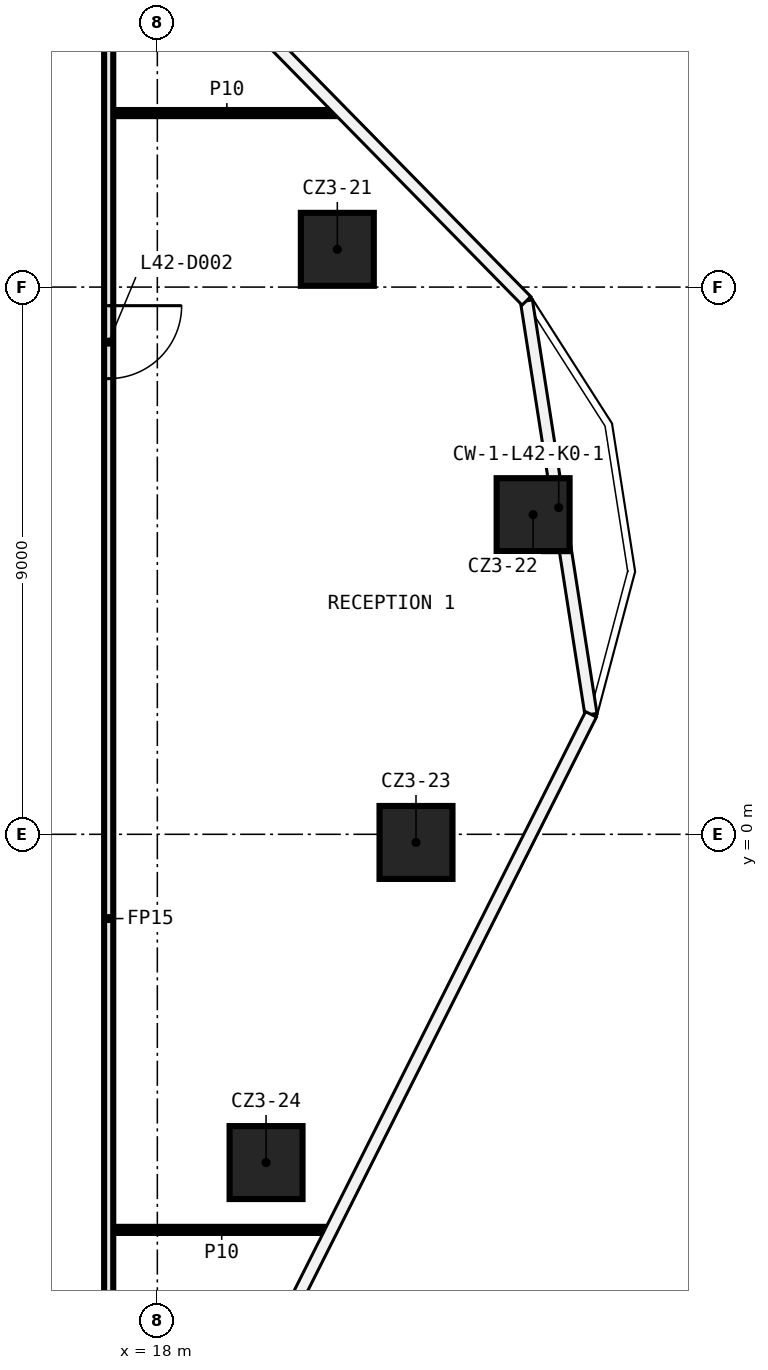
"""IFC4 building model, lengths in metres.
Left out: names, types, materials, properties, quantities, classifications, styles, units other than length and angle.
Written with IfcOpenShell. Run it as: python <this file> out.ifc"""

import sys

from ifc_helpers import new_model, si_unit, direction, frame, frame_2d, origin, origin_2d, place, context, subcontext, project, spatial, rectangle, extrude, element, fill, save


model = new_model("IFC4")
c1 = context("Model", 3, precision=1e-05, world=origin(), true_north=direction((0.0, 1.0)))
c2 = subcontext(c1, "Body", "Model", "MODEL_VIEW")
j1 = project(units=[si_unit("LENGTHUNIT", "METRE"), si_unit("PLANEANGLEUNIT", "RADIAN")], contexts=[c1])
p1 = place(None, origin())
s1 = spatial("IfcSite", under=j1, at=p1, CompositionType="ELEMENT")
p2 = place(p1, origin())
s2 = spatial("IfcBuilding", under=s1, at=p2, CompositionType="ELEMENT")
p3 = place(p2, frame((0.0, 0.0, 203.0)))
s3 = spatial("IfcBuildingStorey", under=s2, at=p3, CompositionType="ELEMENT", Elevation=203.0)
for number, where, z_axis, x_axis in (
    (1, (20.96, 9.621, 0.0), (0.0, 0.0, 1.0), (1.0, 0.0, 0.0)),
    (2, (24.18, 5.257, 0.0), (0.0, 0.0, 1.0), (1.0, 0.0, 0.0)),
    (3, (22.254, -0.134, 0.0), (0.0, 0.0, 1.0), (1.0, 0.0, 0.0)),
    (4, (19.788, -5.399, 0.0), (0.0, 0.0, 1.0), (1.0, 0.0, 0.0)),
):
    element("IfcColumn", number, at=place(p3, frame(where, z_axis=z_axis, x_axis=x_axis)), inside=s3, PredefinedType="COLUMN", context=c2, shape_type="SweptSolid", body=[
        extrude(rectangle(XDim=1.2, YDim=1.2, at=origin_2d()), origin(), (0.0, 0.0, 1.0), 3.82),
    ])
p4 = place(p3, frame((17.275, -6.506, 0.0), z_axis=(0.0, 0.0, 1.0), x_axis=(1.0, 0.0, 0.0)))
e5 = element("IfcWall", 5, at=p4, inside=s3, PredefinedType="PARTITIONING", context=c2, shape_type="SweptSolid", body=[
    extrude(rectangle(XDim=3.568, YDim=0.1, at=frame_2d((1.784, 0.0))), origin(), (0.0, 0.0, 1.0), 3.82),
])
p5 = place(p3, frame((17.275, 11.862, 0.0), z_axis=(0.0, 0.0, 1.0), x_axis=(1.0, 0.0, 0.0)))
e6 = element("IfcWall", 6, at=p5, inside=s3, PredefinedType="PARTITIONING", context=c2, shape_type="SweptSolid", body=[
    extrude(rectangle(XDim=3.737, YDim=0.1, at=frame_2d((1.868, 0.0))), origin(), (0.0, 0.0, 1.0), 3.82),
])
p6 = place(p3, frame((17.2, 13.106, 0.0), z_axis=(0.0, 0.0, 1.0), x_axis=(0.0, -1.0, 0.0)))
e7 = element("IfcWall", 7, at=p6, inside=s3, PredefinedType="PARTITIONING", context=c2, shape_type="SweptSolid", body=[
    extrude(rectangle(XDim=23.172, YDim=0.15, at=frame_2d((11.586, 0.0))), origin(), (0.0, 0.0, 1.0), 3.82),
])
p7 = place(p6, frame((4.412, 0.0, 0.0)))
e8 = element("IfcOpeningElement", 8, at=p7, cuts=e7, PredefinedType="OPENING", context=c2, shape_type="SweptSolid", body=[
    extrude(rectangle(XDim=1.2, YDim=2.1, at=frame_2d((0.6, 1.05))), frame((0.0, 0.085, 0.0), z_axis=(0.0, -1.0, 0.0), x_axis=(1.0, 0.0, 0.0)), (0.0, 0.0, 1.0), 0.17),
])
p8 = place(p7, origin())
e9 = element("IfcDoor", 9, at=p8, inside=s3, OperationType="SINGLE_SWING_LEFT", PredefinedType="DOOR", context=c2, shape_type="SweptSolid", body=[
    extrude(rectangle(XDim=1.2, YDim=2.1, at=frame_2d((0.6, 1.05))), frame((0.0, 0.025, 0.0), z_axis=(0.0, -1.0, 0.0), x_axis=(1.0, 0.0, 0.0)), (0.0, 0.0, 1.0), 0.05),
])
fill(e8, e9)
save(model, sys.argv[1])
